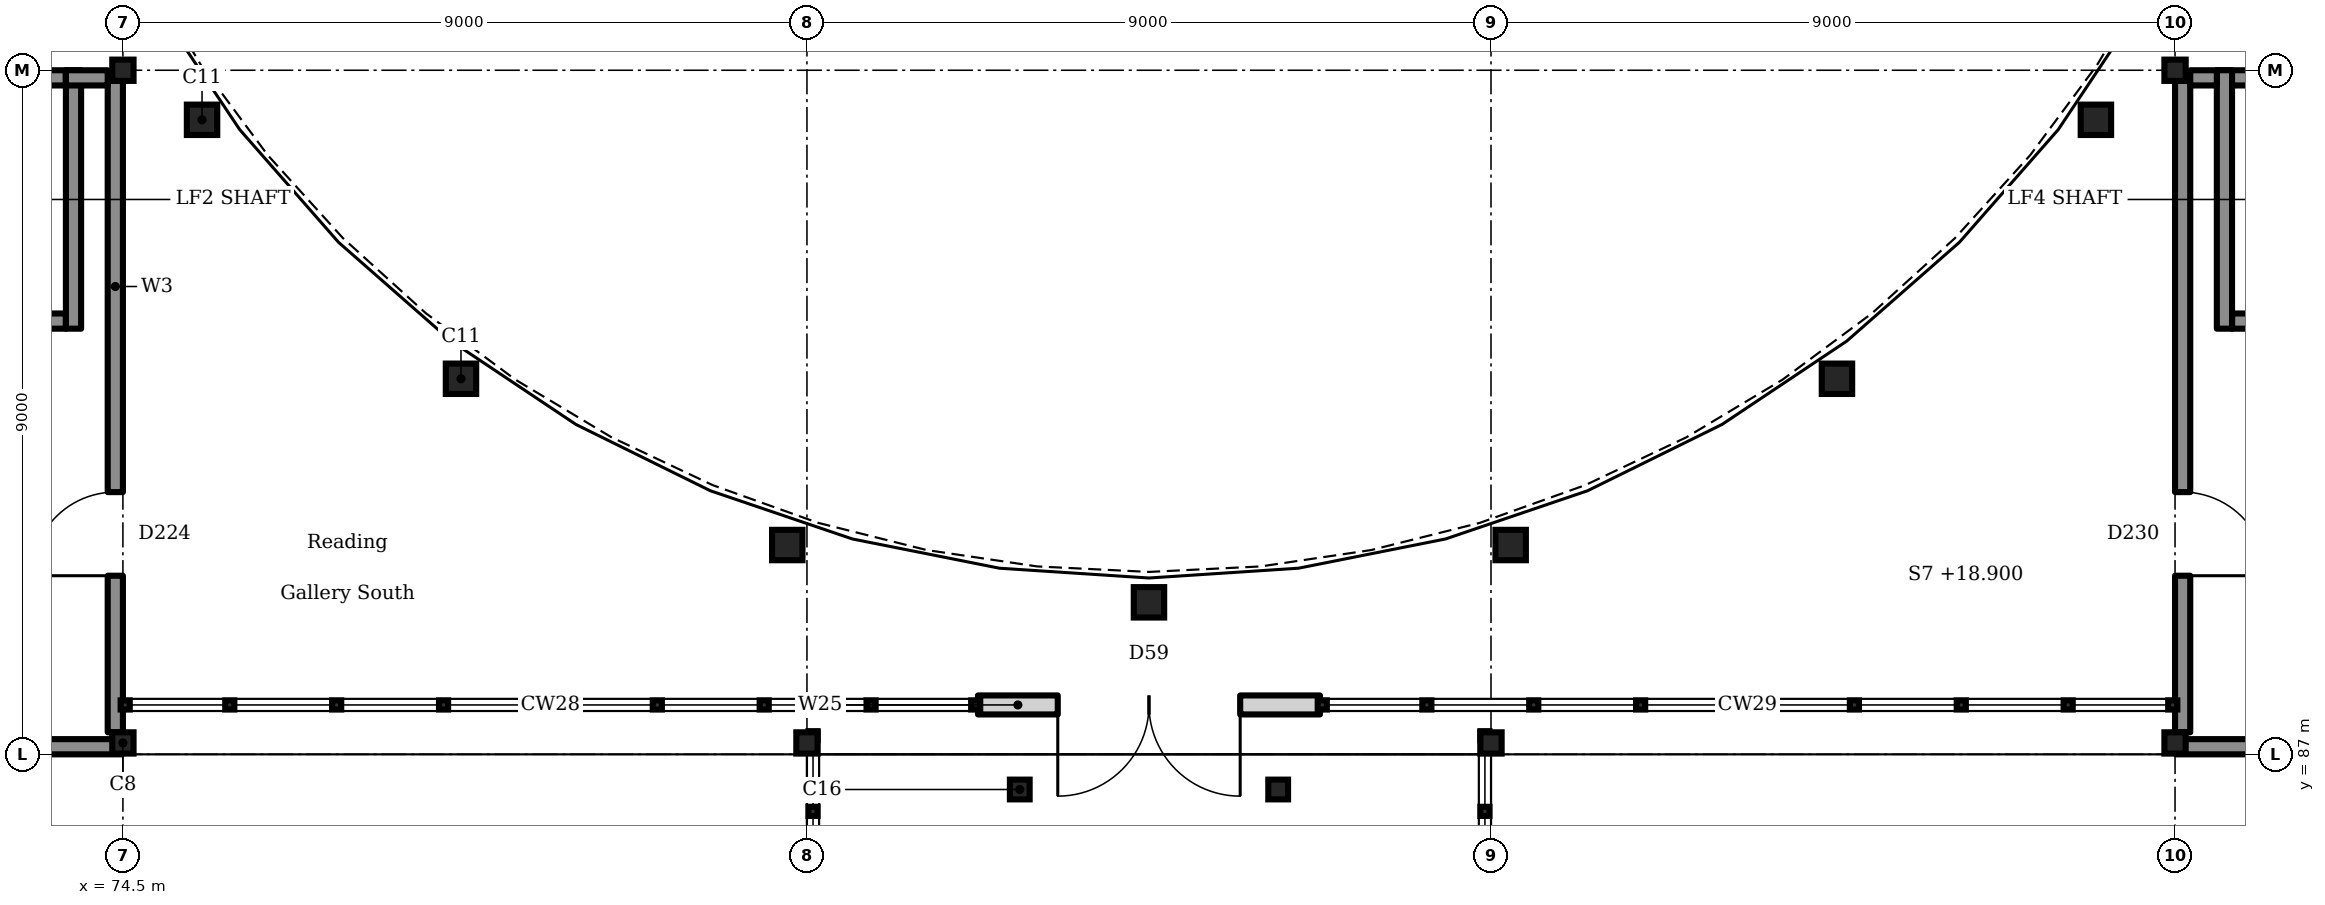
"""IFC4 building model, lengths in metres.
Left out: names, types, materials, properties, quantities, classifications, styles, units other than length and angle.
Written with IfcOpenShell. Run it as: python <this file> out.ifc"""

import sys

from ifc_helpers import new_model, si_unit, direction, frame, frame_2d, origin, origin_2d, place, context, subcontext, project, spatial, rectangle, hollow_circle, i_section, extrude, element, fill, save


model = new_model("IFC4")
c1 = context("Model", 3, precision=1e-05, world=origin(), true_north=direction((0.0, 1.0)))
c2 = subcontext(c1, "Body", "Model", "MODEL_VIEW")
j1 = project(units=[si_unit("LENGTHUNIT", "METRE"), si_unit("PLANEANGLEUNIT", "RADIAN")], contexts=[c1])
p1 = place(None, origin())
s1 = spatial("IfcSite", under=j1, at=p1, CompositionType="ELEMENT")
p2 = place(p1, origin())
s2 = spatial("IfcBuilding", under=s1, at=p2, CompositionType="ELEMENT")
p3 = place(p2, frame((0.0, 0.0, 18.9)))
s3 = spatial("IfcBuildingStorey", under=s2, at=p3, CompositionType="ELEMENT", Elevation=18.9)
p4 = place(p3, frame((71.15, 95.9, 0.0), z_axis=(0.0, 0.0, 1.0), x_axis=(1.0, 0.0, 0.0)))
e1 = element("IfcWall", 1, at=p4, inside=s3, PredefinedType="SOLIDWALL", context=c2, shape_type="SweptSolid", body=[
    extrude(rectangle(XDim=2.6, YDim=0.2, at=frame_2d((1.3, 0.0))), origin(), (0.0, 0.0, 1.0), 4.5),
])
p5 = place(p3, frame((71.15, 92.7, 0.0), z_axis=(0.0, 0.0, 1.0), x_axis=(1.0, 0.0, 0.0)))
e2 = element("IfcWall", 2, at=p5, inside=s3, PredefinedType="SOLIDWALL", context=c2, shape_type="SweptSolid", body=[
    extrude(rectangle(XDim=2.6, YDim=0.2, at=frame_2d((1.3, 0.0))), origin(), (0.0, 0.0, 1.0), 4.5),
])
p6 = place(p5, frame((0.85, 0.0, 0.0)))
e3 = element("IfcOpeningElement", 3, at=p6, cuts=e2, PredefinedType="OPENING", context=c2, shape_type="SweptSolid", body=[
    extrude(rectangle(XDim=1.1, YDim=2.1, at=frame_2d((0.55, 1.05))), frame((0.0, 0.11, 0.0), z_axis=(0.0, -1.0, 0.0), x_axis=(1.0, 0.0, 0.0)), (0.0, 0.0, 1.0), 0.22),
])
p7 = place(p3, frame((73.85, 92.6, 0.0), z_axis=(0.0, 0.0, 1.0), x_axis=(0.0, 1.0, 0.0)))
e4 = element("IfcWall", 4, at=p7, inside=s3, PredefinedType="SOLIDWALL", context=c2, shape_type="SweptSolid", body=[
    extrude(rectangle(XDim=3.4, YDim=0.2, at=frame_2d((1.7, 0.0))), origin(), (0.0, 0.0, 1.0), 4.5),
])
p8 = place(p3, frame((102.05, 95.9, 0.0), z_axis=(0.0, 0.0, 1.0), x_axis=(1.0, 0.0, 0.0)))
e5 = element("IfcWall", 5, at=p8, inside=s3, PredefinedType="SOLIDWALL", context=c2, shape_type="SweptSolid", body=[
    extrude(rectangle(XDim=2.6, YDim=0.2, at=frame_2d((1.3, 0.0))), origin(), (0.0, 0.0, 1.0), 4.5),
])
p9 = place(p3, frame((102.25, 92.7, 0.0), z_axis=(0.0, 0.0, 1.0), x_axis=(1.0, 0.0, 0.0)))
e6 = element("IfcWall", 6, at=p9, inside=s3, PredefinedType="SOLIDWALL", context=c2, shape_type="SweptSolid", body=[
    extrude(rectangle(XDim=2.4, YDim=0.2, at=frame_2d((1.2, 0.0))), origin(), (0.0, 0.0, 1.0), 4.5),
])
p10 = place(p9, frame((0.65, 0.0, 0.0)))
e7 = element("IfcOpeningElement", 7, at=p10, cuts=e6, PredefinedType="OPENING", context=c2, shape_type="SweptSolid", body=[
    extrude(rectangle(XDim=1.1, YDim=2.1, at=frame_2d((0.55, 1.05))), frame((0.0, 0.11, 0.0), z_axis=(0.0, -1.0, 0.0), x_axis=(1.0, 0.0, 0.0)), (0.0, 0.0, 1.0), 0.22),
])
p11 = place(p3, frame((102.15, 92.6, 0.0), z_axis=(0.0, 0.0, 1.0), x_axis=(0.0, 1.0, 0.0)))
e8 = element("IfcWall", 8, at=p11, inside=s3, PredefinedType="SOLIDWALL", context=c2, shape_type="SweptSolid", body=[
    extrude(rectangle(XDim=3.4, YDim=0.2, at=frame_2d((1.7, 0.0))), origin(), (0.0, 0.0, 1.0), 4.5),
])
for number, where, z_axis, x_axis in (
    (9, (74.5, 87.15, 0.0), (0.0, 0.0, 1.0), (1.0, 0.0, 0.0)),
    (10, (83.5, 87.15, 0.0), (0.0, 0.0, 1.0), (1.0, 0.0, 0.0)),
    (11, (92.5, 87.15, 0.0), (0.0, 0.0, 1.0), (1.0, 0.0, 0.0)),
    (12, (101.5, 87.15, 0.0), (0.0, 0.0, 1.0), (1.0, 0.0, 0.0)),
    (13, (74.5, 96.0, 0.0), (0.0, 0.0, 1.0), (1.0, 0.0, 0.0)),
    (14, (101.5, 96.0, 0.0), (0.0, 0.0, 1.0), (1.0, 0.0, 0.0)),
):
    element("IfcColumn", number, at=place(p3, frame(where, z_axis=z_axis, x_axis=x_axis)), inside=s3, PredefinedType="COLUMN", context=c2, shape_type="SweptSolid", body=[
        extrude(i_section(OverallWidth=0.28, OverallDepth=0.28, WebThickness=0.01, FlangeThickness=0.018, FilletRadius=0.024, at=origin_2d()), origin(), (0.0, 0.0, 1.0), 4.5),
    ])
for number, where, z_axis, x_axis in (
    (15, (75.541, 95.348, 0.0), (0.0, 0.0, 1.0), (1.0, 0.0, 0.0)),
    (16, (78.948, 91.941, 0.0), (0.0, 0.0, 1.0), (1.0, 0.0, 0.0)),
    (17, (83.241, 89.754, 0.0), (0.0, 0.0, 1.0), (1.0, 0.0, 0.0)),
    (18, (88.0, 89.0, 0.0), (0.0, 0.0, 1.0), (1.0, 0.0, 0.0)),
    (19, (92.759, 89.754, 0.0), (0.0, 0.0, 1.0), (1.0, 0.0, 0.0)),
    (20, (97.052, 91.941, 0.0), (0.0, 0.0, 1.0), (1.0, 0.0, 0.0)),
    (21, (100.459, 95.348, 0.0), (0.0, 0.0, 1.0), (1.0, 0.0, 0.0)),
):
    element("IfcColumn", number, at=place(p3, frame(where, z_axis=z_axis, x_axis=x_axis)), inside=s3, PredefinedType="COLUMN", context=c2, shape_type="SweptSolid", body=[
        extrude(hollow_circle(Radius=0.203, WallThickness=0.012, at=origin_2d()), origin(), (0.0, 0.0, 1.0), 4.5),
    ])
for number, where, z_axis, x_axis in (
    (22, (86.3, 86.538, 0.0), (0.0, 0.0, 1.0), (1.0, 0.0, 0.0)),
    (23, (89.7, 86.538, 0.0), (0.0, 0.0, 1.0), (1.0, 0.0, 0.0)),
):
    element("IfcColumn", number, at=place(p3, frame(where, z_axis=z_axis, x_axis=x_axis)), inside=s3, PredefinedType="COLUMN", context=c2, shape_type="SweptSolid", body=[
        extrude(i_section(OverallWidth=0.26, OverallDepth=0.26, WebThickness=0.01, FlangeThickness=0.018, FilletRadius=0.024, at=origin_2d()), origin(), (0.0, 0.0, 1.0), 4.35),
    ])
p12 = place(p3, frame((85.75, 87.65, 0.0), z_axis=(0.0, 0.0, 1.0), x_axis=(1.0, 0.0, 0.0)))
e24 = element("IfcWall", 24, at=p12, inside=s3, PredefinedType="SOLIDWALL", context=c2, shape_type="SweptSolid", body=[
    extrude(rectangle(XDim=4.5, YDim=0.25, at=frame_2d((2.25, 0.0))), origin(), (0.0, 0.0, 1.0), 4.15),
])
p13 = place(p12, frame((1.05, 0.0, 0.0)))
e25 = element("IfcOpeningElement", 25, at=p13, cuts=e24, PredefinedType="OPENING", context=c2, shape_type="SweptSolid", body=[
    extrude(rectangle(XDim=2.4, YDim=2.4, at=frame_2d((1.2, 1.2))), frame((0.0, 0.135, 0.0), z_axis=(0.0, -1.0, 0.0), x_axis=(1.0, 0.0, 0.0)), (0.0, 0.0, 1.0), 0.27),
])
p14 = place(p3, frame((74.4, 87.29, 0.0), z_axis=(0.0, 0.0, 1.0), x_axis=(0.0, 1.0, 0.0)))
e26 = element("IfcWall", 26, at=p14, inside=s3, PredefinedType="SOLIDWALL", context=c2, shape_type="SweptSolid", body=[
    extrude(rectangle(XDim=8.57, YDim=0.2, at=frame_2d((4.285, 0.0))), origin(), (0.0, 0.0, 1.0), 4.35),
])
p15 = place(p14, frame((2.06, 0.0, 0.0)))
e27 = element("IfcOpeningElement", 27, at=p15, cuts=e26, PredefinedType="OPENING", context=c2, shape_type="SweptSolid", body=[
    extrude(rectangle(XDim=1.1, YDim=2.1, at=frame_2d((0.55, 1.05))), frame((0.0, 0.11, 0.0), z_axis=(0.0, -1.0, 0.0), x_axis=(1.0, 0.0, 0.0)), (0.0, 0.0, 1.0), 0.22),
])
p16 = place(p3, frame((65.511, 87.1, 0.0), z_axis=(0.0, 0.0, 1.0), x_axis=(1.0, 0.0, 0.0)))
e28 = element("IfcWall", 28, at=p16, inside=s3, PredefinedType="SOLIDWALL", context=c2, shape_type="SweptSolid", body=[
    extrude(rectangle(XDim=8.978, YDim=0.2, at=frame_2d((4.489, 0.0))), origin(), (0.0, 0.0, 1.0), 4.35),
])
p17 = place(p16, frame((1.989, 0.0, 2.9)))
e29 = element("IfcOpeningElement", 29, at=p17, cuts=e28, PredefinedType="OPENING", context=c2, shape_type="SweptSolid", body=[
    extrude(rectangle(XDim=0.5, YDim=1.2, at=frame_2d((0.25, 0.6))), frame((0.0, 0.11, 0.0), z_axis=(0.0, -1.0, 0.0), x_axis=(1.0, 0.0, 0.0)), (0.0, 0.0, 1.0), 0.22),
])
p18 = place(p16, frame((6.489, 0.0, 2.9)))
e30 = element("IfcOpeningElement", 30, at=p18, cuts=e28, PredefinedType="OPENING", context=c2, shape_type="SweptSolid", body=[
    extrude(rectangle(XDim=0.5, YDim=1.2, at=frame_2d((0.25, 0.6))), frame((0.0, 0.11, 0.0), z_axis=(0.0, -1.0, 0.0), x_axis=(1.0, 0.0, 0.0)), (0.0, 0.0, 1.0), 0.22),
])
p19 = place(p3, frame((73.75, 95.9, 0.0), z_axis=(0.0, 0.0, 1.0), x_axis=(1.0, 0.0, 0.0)))
e31 = element("IfcWall", 31, at=p19, inside=s3, PredefinedType="SOLIDWALL", context=c2, shape_type="SweptSolid", body=[
    extrude(rectangle(XDim=0.55, YDim=0.2, at=frame_2d((0.275, 0.0))), origin(), (0.0, 0.0, 1.0), 4.5),
])
p20 = place(p3, frame((101.6, 87.29, 0.0), z_axis=(0.0, 0.0, 1.0), x_axis=(0.0, 1.0, 0.0)))
e32 = element("IfcWall", 32, at=p20, inside=s3, PredefinedType="SOLIDWALL", context=c2, shape_type="SweptSolid", body=[
    extrude(rectangle(XDim=8.57, YDim=0.2, at=frame_2d((4.285, 0.0))), origin(), (0.0, 0.0, 1.0), 4.35),
])
p21 = place(p20, frame((2.06, 0.0, 0.0)))
e33 = element("IfcOpeningElement", 33, at=p21, cuts=e32, PredefinedType="OPENING", context=c2, shape_type="SweptSolid", body=[
    extrude(rectangle(XDim=1.1, YDim=2.1, at=frame_2d((0.55, 1.05))), frame((0.0, 0.11, 0.0), z_axis=(0.0, -1.0, 0.0), x_axis=(1.0, 0.0, 0.0)), (0.0, 0.0, 1.0), 0.22),
])
p22 = place(p3, frame((101.511, 87.1, 0.0), z_axis=(0.0, 0.0, 1.0), x_axis=(1.0, 0.0, 0.0)))
e34 = element("IfcWall", 34, at=p22, inside=s3, PredefinedType="SOLIDWALL", context=c2, shape_type="SweptSolid", body=[
    extrude(rectangle(XDim=8.978, YDim=0.2, at=frame_2d((4.489, 0.0))), origin(), (0.0, 0.0, 1.0), 4.35),
])
p23 = place(p22, frame((1.989, 0.0, 2.9)))
e35 = element("IfcOpeningElement", 35, at=p23, cuts=e34, PredefinedType="OPENING", context=c2, shape_type="SweptSolid", body=[
    extrude(rectangle(XDim=0.5, YDim=1.2, at=frame_2d((0.25, 0.6))), frame((0.0, 0.11, 0.0), z_axis=(0.0, -1.0, 0.0), x_axis=(1.0, 0.0, 0.0)), (0.0, 0.0, 1.0), 0.22),
])
p24 = place(p22, frame((6.489, 0.0, 2.9)))
e36 = element("IfcOpeningElement", 36, at=p24, cuts=e34, PredefinedType="OPENING", context=c2, shape_type="SweptSolid", body=[
    extrude(rectangle(XDim=0.5, YDim=1.2, at=frame_2d((0.25, 0.6))), frame((0.0, 0.11, 0.0), z_axis=(0.0, -1.0, 0.0), x_axis=(1.0, 0.0, 0.0)), (0.0, 0.0, 1.0), 0.22),
])
p25 = place(p3, frame((101.7, 95.9, 0.0), z_axis=(0.0, 0.0, 1.0), x_axis=(1.0, 0.0, 0.0)))
e37 = element("IfcWall", 37, at=p25, inside=s3, PredefinedType="SOLIDWALL", context=c2, shape_type="SweptSolid", body=[
    extrude(rectangle(XDim=0.35, YDim=0.2, at=frame_2d((0.175, 0.0))), origin(), (0.0, 0.0, 1.0), 4.5),
])
p26 = place(p13, frame((2.4, 0.0, 0.0), z_axis=(0.0, 0.0, 1.0), x_axis=(-1.0, 0.0, 0.0)))
e38 = element("IfcDoor", 38, at=p26, inside=s3, OperationType="DOUBLE_DOOR_SINGLE_SWING", PredefinedType="DOOR", context=c2, shape_type="SweptSolid", body=[
    extrude(rectangle(XDim=2.4, YDim=2.4, at=frame_2d((1.2, 1.2))), frame((0.0, 0.025, 0.0), z_axis=(0.0, -1.0, 0.0), x_axis=(1.0, 0.0, 0.0)), (0.0, 0.0, 1.0), 0.05),
])
fill(e25, e38)
p27 = place(p15, origin())
e39 = element("IfcDoor", 39, at=p27, inside=s3, OperationType="SINGLE_SWING_RIGHT", PredefinedType="DOOR", context=c2, shape_type="SweptSolid", body=[
    extrude(rectangle(XDim=1.1, YDim=2.1, at=frame_2d((0.55, 1.05))), frame((0.0, 0.025, 0.0), z_axis=(0.0, -1.0, 0.0), x_axis=(1.0, 0.0, 0.0)), (0.0, 0.0, 1.0), 0.05),
])
fill(e27, e39)
p28 = place(p21, frame((1.1, 0.0, 0.0), z_axis=(0.0, 0.0, 1.0), x_axis=(-1.0, 0.0, 0.0)))
e40 = element("IfcDoor", 40, at=p28, inside=s3, OperationType="SINGLE_SWING_LEFT", PredefinedType="DOOR", context=c2, shape_type="SweptSolid", body=[
    extrude(rectangle(XDim=1.1, YDim=2.1, at=frame_2d((0.55, 1.05))), frame((0.0, 0.025, 0.0), z_axis=(0.0, -1.0, 0.0), x_axis=(1.0, 0.0, 0.0)), (0.0, 0.0, 1.0), 0.05),
])
fill(e33, e40)
save(model, sys.argv[1])
